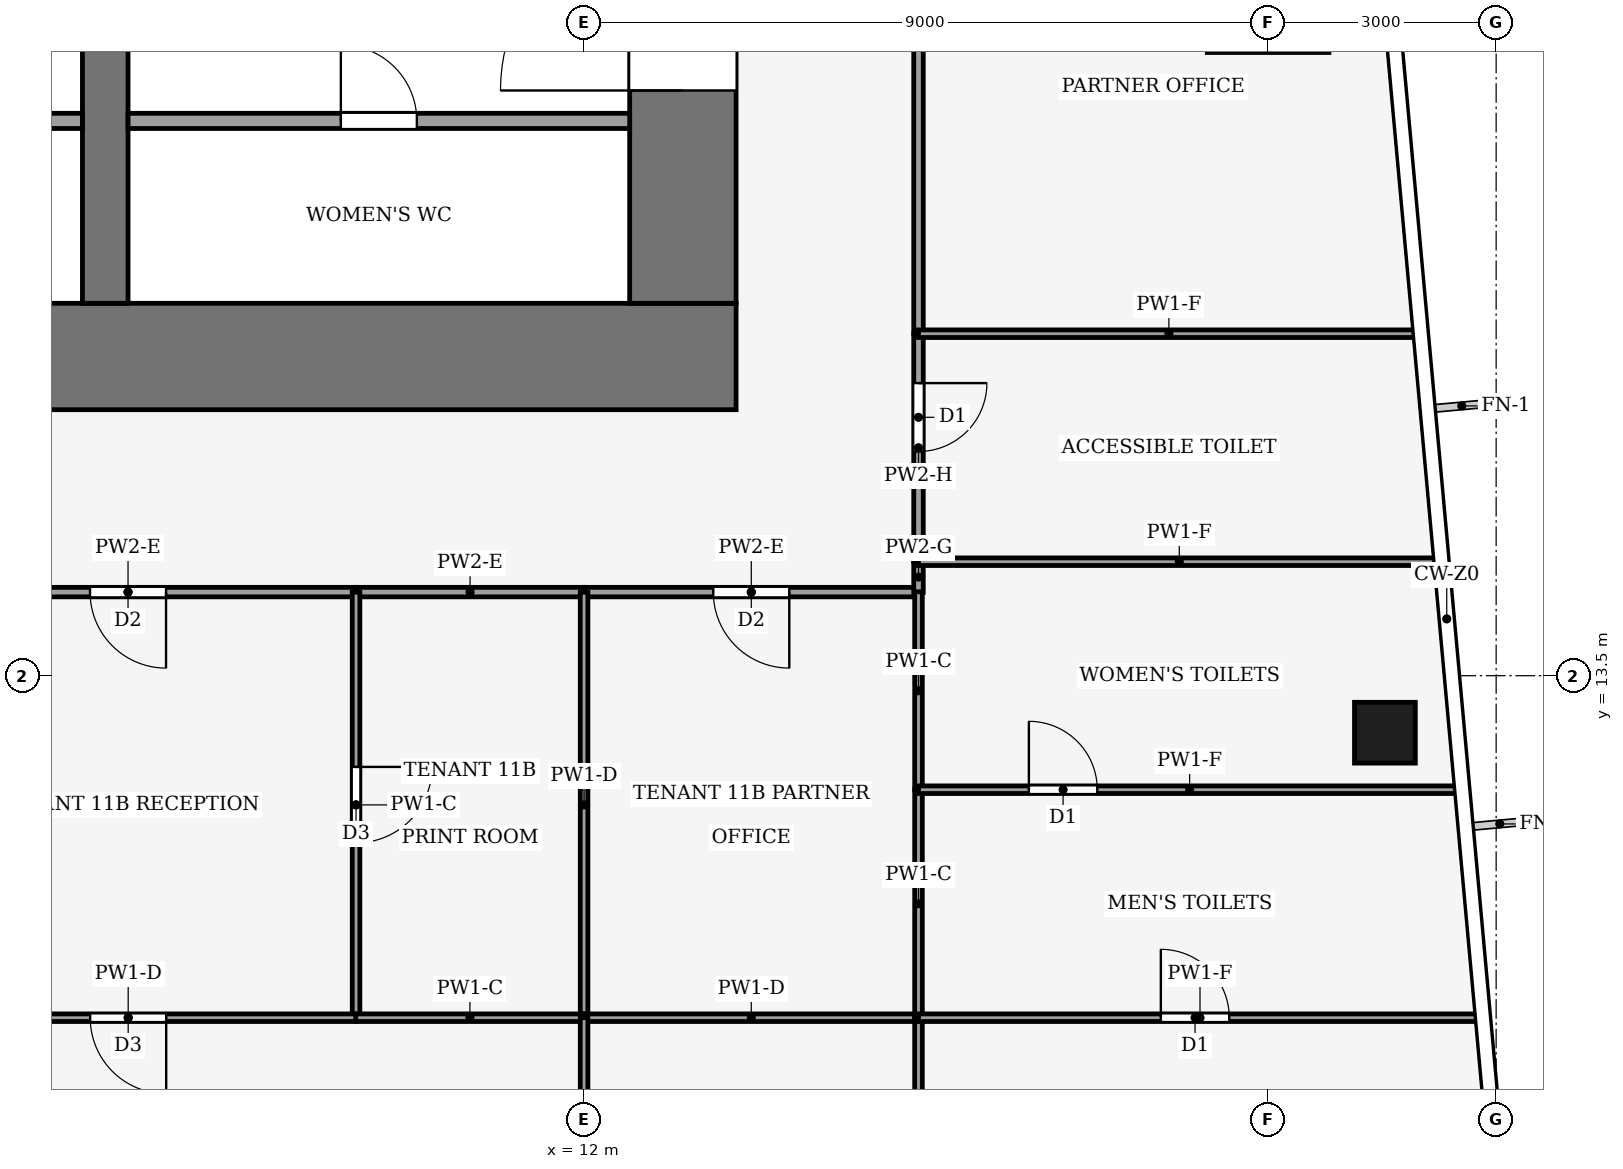
"""IFC4 building model, lengths in metres.
Left out: names, types, materials, properties, quantities, classifications, styles, units other than length and angle.
Written with IfcOpenShell. Run it as: python <this file> out.ifc"""

import sys

from ifc_helpers import new_model, si_unit, direction, frame, frame_2d, origin, origin_2d, place, context, subcontext, project, spatial, rectangle, hollow_rectangle, extrude, element, fill, save


model = new_model("IFC4")
c1 = context("Model", 3, precision=1e-05, world=origin(), true_north=direction((0.0, 1.0)))
c2 = subcontext(c1, "Body", "Model", "MODEL_VIEW")
j1 = project(units=[si_unit("LENGTHUNIT", "METRE"), si_unit("PLANEANGLEUNIT", "RADIAN")], contexts=[c1])
p1 = place(None, origin())
s1 = spatial("IfcSite", under=j1, at=p1, CompositionType="ELEMENT")
p2 = place(p1, origin())
s2 = spatial("IfcBuilding", under=s1, at=p2, CompositionType="ELEMENT")
p3 = place(p2, frame((0.0, 0.0, 50.0)))
s3 = spatial("IfcBuildingStorey", under=s2, at=p3, CompositionType="ELEMENT", Elevation=50.0)
p4 = place(p3, frame((-14.0, 17.7, -0.13), z_axis=(0.0, 0.0, 1.0), x_axis=(1.0, 0.0, 0.0)))
e1 = element("IfcWall", 1, at=p4, inside=s3, PredefinedType="SHEAR", context=c2, shape_type="SweptSolid", body=[
    extrude(rectangle(XDim=28.0, YDim=1.4, at=frame_2d((14.0, 0.0))), origin(), (0.0, 0.0, 1.0), 4.0),
])
p5 = place(p3, frame((13.3, 18.4, -0.13), z_axis=(0.0, 0.0, 1.0), x_axis=(0.0, 1.0, 0.0)))
e2 = element("IfcWall", 2, at=p5, inside=s3, PredefinedType="SHEAR", context=c2, shape_type="SweptSolid", body=[
    extrude(rectangle(XDim=19.2, YDim=1.4, at=frame_2d((9.6, 0.0))), origin(), (0.0, 0.0, 1.0), 4.0),
])
p6 = place(p5, frame((2.8, 0.0, 0.13)))
e3 = element("IfcOpeningElement", 3, at=p6, cuts=e2, PredefinedType="OPENING", context=c2, shape_type="SweptSolid", body=[
    extrude(rectangle(XDim=2.4, YDim=2.4, at=frame_2d((1.2, 1.2))), frame((0.0, 0.71, 0.0), z_axis=(0.0, -1.0, 0.0), x_axis=(1.0, 0.0, 0.0)), (0.0, 0.0, 1.0), 1.42),
])
p7 = place(p5, frame((13.3, 0.0, 0.13)))
e4 = element("IfcOpeningElement", 4, at=p7, cuts=e2, PredefinedType="OPENING", context=c2, shape_type="SweptSolid", body=[
    extrude(rectangle(XDim=2.4, YDim=2.4, at=frame_2d((1.2, 1.2))), frame((0.0, 0.71, 0.0), z_axis=(0.0, -1.0, 0.0), x_axis=(1.0, 0.0, 0.0)), (0.0, 0.0, 1.0), 1.42),
])
p8 = place(p3, frame((5.7, 18.4, -0.13), z_axis=(0.0, 0.0, 1.0), x_axis=(0.0, 1.0, 0.0)))
e5 = element("IfcWall", 5, at=p8, inside=s3, PredefinedType="SHEAR", context=c2, shape_type="SweptSolid", body=[
    extrude(rectangle(XDim=19.2, YDim=0.6, at=frame_2d((9.6, 0.0))), origin(), (0.0, 0.0, 1.0), 4.0),
])
p9 = place(p8, frame((8.35, 0.0, 0.13)))
e6 = element("IfcOpeningElement", 6, at=p9, cuts=e5, PredefinedType="OPENING", context=c2, shape_type="SweptSolid", body=[
    extrude(rectangle(XDim=0.9, YDim=2.1, at=frame_2d((0.45, 1.05))), frame((0.0, 0.31, 0.0), z_axis=(0.0, -1.0, 0.0), x_axis=(1.0, 0.0, 0.0)), (0.0, 0.0, 1.0), 0.62),
])
p10 = place(p8, frame((13.3, 0.0, 0.13)))
e7 = element("IfcOpeningElement", 7, at=p10, cuts=e5, PredefinedType="OPENING", context=c2, shape_type="SweptSolid", body=[
    extrude(rectangle(XDim=2.4, YDim=2.4, at=frame_2d((1.2, 1.2))), frame((0.0, 0.31, 0.0), z_axis=(0.0, -1.0, 0.0), x_axis=(1.0, 0.0, 0.0)), (0.0, 0.0, 1.0), 0.62),
])
p11 = place(p3, frame((22.536, 12.75, 0.0), z_axis=(0.0, 0.0, 1.0), x_axis=(1.0, 0.0, 0.0)))
e8 = element("IfcColumn", 8, at=p11, inside=s3, PredefinedType="COLUMN", context=c2, shape_type="SweptSolid", body=[
    extrude(hollow_rectangle(XDim=0.8, YDim=0.8, WallThickness=0.04, at=origin_2d()), origin(), (0.0, 0.0, 1.0), 4.0),
])
p12 = place(p3, frame((-5.4, 20.8, 0.0), z_axis=(0.0, 0.0, 1.0), x_axis=(1.0, 0.0, 0.0)))
e9 = element("IfcWall", 9, at=p12, inside=s3, PredefinedType="PARTITIONING", context=c2, shape_type="SweptSolid", body=[
    extrude(rectangle(XDim=10.8, YDim=0.2, at=frame_2d((5.4, 0.0))), origin(), (0.0, 0.0, 1.0), 3.87),
])
p13 = place(p12, frame((0.75, 0.0, 0.0)))
e10 = element("IfcOpeningElement", 10, at=p13, cuts=e9, PredefinedType="OPENING", context=c2, shape_type="SweptSolid", body=[
    extrude(rectangle(XDim=1.2, YDim=2.2, at=frame_2d((0.6, 1.1))), frame((0.0, 0.11, 0.0), z_axis=(0.0, -1.0, 0.0), x_axis=(1.0, 0.0, 0.0)), (0.0, 0.0, 1.0), 0.22),
])
p14 = place(p12, frame((3.45, 0.0, 0.0)))
e11 = element("IfcOpeningElement", 11, at=p14, cuts=e9, PredefinedType="OPENING", context=c2, shape_type="SweptSolid", body=[
    extrude(rectangle(XDim=1.2, YDim=2.2, at=frame_2d((0.6, 1.1))), frame((0.0, 0.11, 0.0), z_axis=(0.0, -1.0, 0.0), x_axis=(1.0, 0.0, 0.0)), (0.0, 0.0, 1.0), 0.22),
])
p15 = place(p12, frame((6.15, 0.0, 0.0)))
e12 = element("IfcOpeningElement", 12, at=p15, cuts=e9, PredefinedType="OPENING", context=c2, shape_type="SweptSolid", body=[
    extrude(rectangle(XDim=1.2, YDim=2.2, at=frame_2d((0.6, 1.1))), frame((0.0, 0.11, 0.0), z_axis=(0.0, -1.0, 0.0), x_axis=(1.0, 0.0, 0.0)), (0.0, 0.0, 1.0), 0.22),
])
p16 = place(p12, frame((8.85, 0.0, 0.0)))
e13 = element("IfcOpeningElement", 13, at=p16, cuts=e9, PredefinedType="OPENING", context=c2, shape_type="SweptSolid", body=[
    extrude(rectangle(XDim=1.2, YDim=2.2, at=frame_2d((0.6, 1.1))), frame((0.0, 0.11, 0.0), z_axis=(0.0, -1.0, 0.0), x_axis=(1.0, 0.0, 0.0)), (0.0, 0.0, 1.0), 0.22),
])
p17 = place(p3, frame((6.0, 20.8, 0.0), z_axis=(0.0, 0.0, 1.0), x_axis=(1.0, 0.0, 0.0)))
e14 = element("IfcWall", 14, at=p17, inside=s3, PredefinedType="PARTITIONING", context=c2, shape_type="SweptSolid", body=[
    extrude(rectangle(XDim=6.6, YDim=0.2, at=frame_2d((3.3, 0.0))), origin(), (0.0, 0.0, 1.0), 3.87),
])
p18 = place(p17, frame((2.8, 0.0, 0.0)))
e15 = element("IfcOpeningElement", 15, at=p18, cuts=e14, PredefinedType="OPENING", context=c2, shape_type="SweptSolid", body=[
    extrude(rectangle(XDim=1.0, YDim=2.1, at=frame_2d((0.5, 1.05))), frame((0.0, 0.11, 0.0), z_axis=(0.0, -1.0, 0.0), x_axis=(1.0, 0.0, 0.0)), (0.0, 0.0, 1.0), 0.22),
])
p19 = place(p3, frame((9.0, 14.6, 0.0), z_axis=(0.0, 0.0, 1.0), x_axis=(-1.0, 0.0, 0.0)))
e16 = element("IfcWall", 16, at=p19, inside=s3, PredefinedType="PARTITIONING", context=c2, shape_type="SweptSolid", body=[
    extrude(rectangle(XDim=6.0, YDim=0.125, at=frame_2d((3.0, 0.0))), origin(), (0.0, 0.0, 1.0), 3.29),
])
p20 = place(p19, frame((2.5, 0.0, 0.0)))
e17 = element("IfcOpeningElement", 17, at=p20, cuts=e16, PredefinedType="OPENING", context=c2, shape_type="SweptSolid", body=[
    extrude(rectangle(XDim=1.0, YDim=2.1, at=frame_2d((0.5, 1.05))), frame((0.0, 0.073, 0.0), z_axis=(0.0, -1.0, 0.0), x_axis=(1.0, 0.0, 0.0)), (0.0, 0.0, 1.0), 0.145),
])
p21 = place(p3, frame((9.0, 14.6, 0.0), z_axis=(0.0, 0.0, 1.0), x_axis=(1.0, 0.0, 0.0)))
e18 = element("IfcWall", 18, at=p21, inside=s3, PredefinedType="PARTITIONING", context=c2, shape_type="SweptSolid", body=[
    extrude(rectangle(XDim=3.0, YDim=0.125, at=frame_2d((1.5, 0.0))), origin(), (0.0, 0.0, 1.0), 3.29),
])
p22 = place(p3, frame((16.4, 14.6, 0.0), z_axis=(0.0, 0.0, 1.0), x_axis=(-1.0, 0.0, 0.0)))
e19 = element("IfcWall", 19, at=p22, inside=s3, PredefinedType="PARTITIONING", context=c2, shape_type="SweptSolid", body=[
    extrude(rectangle(XDim=4.4, YDim=0.125, at=frame_2d((2.2, 0.0))), origin(), (0.0, 0.0, 1.0), 3.29),
])
p23 = place(p22, frame((1.7, 0.0, 0.0)))
e20 = element("IfcOpeningElement", 20, at=p23, cuts=e19, PredefinedType="OPENING", context=c2, shape_type="SweptSolid", body=[
    extrude(rectangle(XDim=1.0, YDim=2.1, at=frame_2d((0.5, 1.05))), frame((0.0, 0.073, 0.0), z_axis=(0.0, -1.0, 0.0), x_axis=(1.0, 0.0, 0.0)), (0.0, 0.0, 1.0), 0.145),
])
p24 = place(p3, frame((16.4, 14.596, 0.0), z_axis=(0.0, 0.0, 1.0), x_axis=(0.0, 1.0, 0.0)))
e21 = element("IfcWall", 21, at=p24, inside=s3, PredefinedType="PARTITIONING", context=c2, shape_type="SweptSolid", body=[
    extrude(rectangle(XDim=0.404, YDim=0.125, at=frame_2d((0.202, 0.0))), origin(), (0.0, 0.0, 1.0), 3.87),
])
p25 = place(p3, frame((16.4, 18.0, 0.0), z_axis=(0.0, 0.0, 1.0), x_axis=(0.0, -1.0, 0.0)))
e22 = element("IfcWall", 22, at=p25, inside=s3, PredefinedType="PARTITIONING", context=c2, shape_type="SweptSolid", body=[
    extrude(rectangle(XDim=3.0, YDim=0.125, at=frame_2d((1.5, 0.0))), origin(), (0.0, 0.0, 1.0), 3.14),
])
p26 = place(p25, frame((0.65, 0.0, 0.0)))
e23 = element("IfcOpeningElement", 23, at=p26, cuts=e22, PredefinedType="OPENING", context=c2, shape_type="SweptSolid", body=[
    extrude(rectangle(XDim=0.9, YDim=2.1, at=frame_2d((0.45, 1.05))), frame((0.0, 0.073, 0.0), z_axis=(0.0, -1.0, 0.0), x_axis=(1.0, 0.0, 0.0)), (0.0, 0.0, 1.0), 0.145),
])
p27 = place(p3, frame((16.4, 27.0, 0.0), z_axis=(0.0, 0.0, 1.0), x_axis=(0.0, -1.0, 0.0)))
e24 = element("IfcWall", 24, at=p27, inside=s3, PredefinedType="PARTITIONING", context=c2, shape_type="SweptSolid", body=[
    extrude(rectangle(XDim=9.0, YDim=0.125, at=frame_2d((4.5, 0.0))), origin(), (0.0, 0.0, 1.0), 3.48),
])
p28 = place(p27, frame((4.0, 0.0, 0.0)))
e25 = element("IfcOpeningElement", 25, at=p28, cuts=e24, PredefinedType="OPENING", context=c2, shape_type="SweptSolid", body=[
    extrude(rectangle(XDim=1.0, YDim=2.1, at=frame_2d((0.5, 1.05))), frame((0.0, 0.073, 0.0), z_axis=(0.0, -1.0, 0.0), x_axis=(1.0, 0.0, 0.0)), (0.0, 0.0, 1.0), 0.145),
])
p29 = place(p3, frame((9.0, 14.6, 0.0), z_axis=(0.0, 0.0, 1.0), x_axis=(0.0, -1.0, 0.0)))
e26 = element("IfcWall", 26, at=p29, inside=s3, PredefinedType="PARTITIONING", context=c2, shape_type="SweptSolid", body=[
    extrude(rectangle(XDim=5.6, YDim=0.1, at=frame_2d((2.8, 0.0))), origin(), (0.0, 0.0, 1.0), 3.87),
])
p30 = place(p29, frame((2.3, 0.0, 0.0)))
e27 = element("IfcOpeningElement", 27, at=p30, cuts=e26, PredefinedType="OPENING", context=c2, shape_type="SweptSolid", body=[
    extrude(rectangle(XDim=1.0, YDim=2.1, at=frame_2d((0.5, 1.05))), frame((0.0, 0.06, 0.0), z_axis=(0.0, -1.0, 0.0), x_axis=(1.0, 0.0, 0.0)), (0.0, 0.0, 1.0), 0.12),
])
p31 = place(p3, frame((9.004, 9.0, 0.0), z_axis=(0.0, 0.0, 1.0), x_axis=(-1.0, 0.0, 0.0)))
e28 = element("IfcWall", 28, at=p31, inside=s3, PredefinedType="PARTITIONING", context=c2, shape_type="SweptSolid", body=[
    extrude(rectangle(XDim=6.004, YDim=0.1, at=frame_2d((3.002, 0.0))), origin(), (0.0, 0.0, 1.0), 3.29),
])
p32 = place(p31, frame((2.502, 0.0, 0.0)))
e29 = element("IfcOpeningElement", 29, at=p32, cuts=e28, PredefinedType="OPENING", context=c2, shape_type="SweptSolid", body=[
    extrude(rectangle(XDim=1.0, YDim=2.1, at=frame_2d((0.5, 1.05))), frame((0.0, 0.06, 0.0), z_axis=(0.0, -1.0, 0.0), x_axis=(1.0, 0.0, 0.0)), (0.0, 0.0, 1.0), 0.12),
])
p33 = place(p3, frame((12.0, 9.0, 0.0), z_axis=(0.0, 0.0, 1.0), x_axis=(0.0, 1.0, 0.0)))
e30 = element("IfcWall", 30, at=p33, inside=s3, PredefinedType="PARTITIONING", context=c2, shape_type="SweptSolid", body=[
    extrude(rectangle(XDim=5.6, YDim=0.1, at=frame_2d((2.8, 0.0))), origin(), (0.0, 0.0, 1.0), 3.29),
])
p34 = place(p3, frame((8.996, 9.0, 0.0), z_axis=(0.0, 0.0, 1.0), x_axis=(1.0, 0.0, 0.0)))
e31 = element("IfcWall", 31, at=p34, inside=s3, PredefinedType="PARTITIONING", context=c2, shape_type="SweptSolid", body=[
    extrude(rectangle(XDim=3.004, YDim=0.1, at=frame_2d((1.502, 0.0))), origin(), (0.0, 0.0, 1.0), 3.87),
])
p35 = place(p3, frame((12.0, 9.0, 0.0), z_axis=(0.0, 0.0, 1.0), x_axis=(1.0, 0.0, 0.0)))
e32 = element("IfcWall", 32, at=p35, inside=s3, PredefinedType="PARTITIONING", context=c2, shape_type="SweptSolid", body=[
    extrude(rectangle(XDim=4.4, YDim=0.1, at=frame_2d((2.2, 0.0))), origin(), (0.0, 0.0, 1.0), 3.29),
])
p36 = place(p3, frame((16.4, 9.0, 0.0), z_axis=(0.0, 0.0, 1.0), x_axis=(0.0, 1.0, 0.0)))
e33 = element("IfcWall", 33, at=p36, inside=s3, PredefinedType="PARTITIONING", context=c2, shape_type="SweptSolid", body=[
    extrude(rectangle(XDim=3.0, YDim=0.1, at=frame_2d((1.5, 0.0))), origin(), (0.0, 0.0, 1.0), 3.87),
])
p37 = place(p3, frame((16.4, 12.0, 0.0), z_axis=(0.0, 0.0, 1.0), x_axis=(0.0, 1.0, 0.0)))
e34 = element("IfcWall", 34, at=p37, inside=s3, PredefinedType="PARTITIONING", context=c2, shape_type="SweptSolid", body=[
    extrude(rectangle(XDim=2.604, YDim=0.1, at=frame_2d((1.302, 0.0))), origin(), (0.0, 0.0, 1.0), 3.87),
])
p38 = place(p3, frame((12.0, 9.0, 0.0), z_axis=(0.0, 0.0, 1.0), x_axis=(0.0, -1.0, 0.0)))
e35 = element("IfcWall", 35, at=p38, inside=s3, PredefinedType="PARTITIONING", context=c2, shape_type="SweptSolid", body=[
    extrude(rectangle(XDim=8.58, YDim=0.1, at=frame_2d((4.29, 0.0))), origin(), (0.0, 0.0, 1.0), 3.04),
])
p39 = place(p38, frame((2.925, 0.0, 0.0)))
e36 = element("IfcOpeningElement", 36, at=p39, cuts=e35, PredefinedType="OPENING", context=c2, shape_type="SweptSolid", body=[
    extrude(rectangle(XDim=1.0, YDim=2.1, at=frame_2d((0.5, 1.05))), frame((0.0, 0.06, 0.0), z_axis=(0.0, -1.0, 0.0), x_axis=(1.0, 0.0, 0.0)), (0.0, 0.0, 1.0), 0.12),
])
p40 = place(p3, frame((16.4, 9.0, 0.0), z_axis=(0.0, 0.0, 1.0), x_axis=(0.0, -1.0, 0.0)))
e37 = element("IfcWall", 37, at=p40, inside=s3, PredefinedType="PARTITIONING", context=c2, shape_type="SweptSolid", body=[
    extrude(rectangle(XDim=8.947, YDim=0.1, at=frame_2d((4.473, 0.0))), origin(), (0.0, 0.0, 1.0), 3.04),
])
p41 = place(p40, frame((3.908, 0.0, 0.0)))
e38 = element("IfcOpeningElement", 38, at=p41, cuts=e37, PredefinedType="OPENING", context=c2, shape_type="SweptSolid", body=[
    extrude(rectangle(XDim=1.0, YDim=2.1, at=frame_2d((0.5, 1.05))), frame((0.0, 0.06, 0.0), z_axis=(0.0, -1.0, 0.0), x_axis=(1.0, 0.0, 0.0)), (0.0, 0.0, 1.0), 0.12),
])
p42 = place(p3, frame((16.4, 9.0, 0.0), z_axis=(0.0, 0.0, 1.0), x_axis=(1.0, 0.0, 0.0)))
e39 = element("IfcWall", 39, at=p42, inside=s3, PredefinedType="PARTITIONING", context=c2, shape_type="SweptSolid", body=[
    extrude(rectangle(XDim=7.407, YDim=0.1, at=frame_2d((3.704, 0.0))), origin(), (0.0, 0.0, 1.0), 3.04),
])
p43 = place(p42, frame((3.188, 0.0, 0.0)))
e40 = element("IfcOpeningElement", 40, at=p43, cuts=e39, PredefinedType="OPENING", context=c2, shape_type="SweptSolid", body=[
    extrude(rectangle(XDim=0.9, YDim=2.1, at=frame_2d((0.45, 1.05))), frame((0.0, 0.06, 0.0), z_axis=(0.0, -1.0, 0.0), x_axis=(1.0, 0.0, 0.0)), (0.0, 0.0, 1.0), 0.12),
])
p44 = place(p3, frame((16.4, 12.0, 0.0), z_axis=(0.0, 0.0, 1.0), x_axis=(1.0, 0.0, 0.0)))
e41 = element("IfcWall", 41, at=p44, inside=s3, PredefinedType="PARTITIONING", context=c2, shape_type="SweptSolid", body=[
    extrude(rectangle(XDim=7.135, YDim=0.1, at=frame_2d((3.567, 0.0))), origin(), (0.0, 0.0, 1.0), 3.04),
])
p45 = place(p44, frame((1.452, 0.0, 0.0)))
e42 = element("IfcOpeningElement", 42, at=p45, cuts=e41, PredefinedType="OPENING", context=c2, shape_type="SweptSolid", body=[
    extrude(rectangle(XDim=0.9, YDim=2.1, at=frame_2d((0.45, 1.05))), frame((0.0, 0.06, 0.0), z_axis=(0.0, -1.0, 0.0), x_axis=(1.0, 0.0, 0.0)), (0.0, 0.0, 1.0), 0.12),
])
p46 = place(p3, frame((23.262, 15.0, 0.0), z_axis=(0.0, 0.0, 1.0), x_axis=(-1.0, 0.0, 0.0)))
e43 = element("IfcWall", 43, at=p46, inside=s3, PredefinedType="PARTITIONING", context=c2, shape_type="SweptSolid", body=[
    extrude(rectangle(XDim=6.862, YDim=0.1, at=frame_2d((3.431, 0.0))), origin(), (0.0, 0.0, 1.0), 3.04),
])
p47 = place(p3, frame((22.989, 18.0, 0.0), z_axis=(0.0, 0.0, 1.0), x_axis=(-1.0, 0.0, 0.0)))
e44 = element("IfcWall", 44, at=p47, inside=s3, PredefinedType="PARTITIONING", context=c2, shape_type="SweptSolid", body=[
    extrude(rectangle(XDim=6.589, YDim=0.1, at=frame_2d((3.294, 0.0))), origin(), (0.0, 0.0, 1.0), 3.04),
])
p48 = place(p18, origin())
e45 = element("IfcDoor", 45, at=p48, inside=s3, OperationType="SINGLE_SWING_RIGHT", PredefinedType="DOOR", context=c2, shape_type="SweptSolid", body=[
    extrude(rectangle(XDim=1.0, YDim=2.1, at=frame_2d((0.5, 1.05))), frame((0.0, 0.025, 0.0), z_axis=(0.0, -1.0, 0.0), x_axis=(1.0, 0.0, 0.0)), (0.0, 0.0, 1.0), 0.05),
])
fill(e15, e45)
p49 = place(p6, origin())
e46 = element("IfcDoor", 46, at=p49, inside=s3, OperationType="DOUBLE_DOOR_SINGLE_SWING", PredefinedType="DOOR", context=c2, shape_type="SweptSolid", body=[
    extrude(rectangle(XDim=2.4, YDim=2.4, at=frame_2d((1.2, 1.2))), frame((0.0, 0.025, 0.0), z_axis=(0.0, -1.0, 0.0), x_axis=(1.0, 0.0, 0.0)), (0.0, 0.0, 1.0), 0.05),
])
fill(e3, e46)
p50 = place(p20, origin())
e47 = element("IfcDoor", 47, at=p50, inside=s3, OperationType="SINGLE_SWING_RIGHT", PredefinedType="DOOR", context=c2, shape_type="SweptSolid", body=[
    extrude(rectangle(XDim=1.0, YDim=2.1, at=frame_2d((0.5, 1.05))), frame((0.0, 0.025, 0.0), z_axis=(0.0, -1.0, 0.0), x_axis=(1.0, 0.0, 0.0)), (0.0, 0.0, 1.0), 0.05),
])
fill(e17, e47)
p51 = place(p23, origin())
e48 = element("IfcDoor", 48, at=p51, inside=s3, OperationType="SINGLE_SWING_LEFT", PredefinedType="DOOR", context=c2, shape_type="SweptSolid", body=[
    extrude(rectangle(XDim=1.0, YDim=2.1, at=frame_2d((0.5, 1.05))), frame((0.0, 0.025, 0.0), z_axis=(0.0, -1.0, 0.0), x_axis=(1.0, 0.0, 0.0)), (0.0, 0.0, 1.0), 0.05),
])
fill(e20, e48)
p52 = place(p26, origin())
e49 = element("IfcDoor", 49, at=p52, inside=s3, OperationType="SINGLE_SWING_LEFT", PredefinedType="DOOR", context=c2, shape_type="SweptSolid", body=[
    extrude(rectangle(XDim=0.9, YDim=2.1, at=frame_2d((0.45, 1.05))), frame((0.0, 0.025, 0.0), z_axis=(0.0, -1.0, 0.0), x_axis=(1.0, 0.0, 0.0)), (0.0, 0.0, 1.0), 0.05),
])
fill(e23, e49)
p53 = place(p30, origin())
e50 = element("IfcDoor", 50, at=p53, inside=s3, OperationType="SINGLE_SWING_RIGHT", PredefinedType="DOOR", context=c2, shape_type="SweptSolid", body=[
    extrude(rectangle(XDim=1.0, YDim=2.1, at=frame_2d((0.5, 1.05))), frame((0.0, 0.025, 0.0), z_axis=(0.0, -1.0, 0.0), x_axis=(1.0, 0.0, 0.0)), (0.0, 0.0, 1.0), 0.05),
])
fill(e27, e50)
p54 = place(p32, origin())
e51 = element("IfcDoor", 51, at=p54, inside=s3, OperationType="SINGLE_SWING_LEFT", PredefinedType="DOOR", context=c2, shape_type="SweptSolid", body=[
    extrude(rectangle(XDim=1.0, YDim=2.1, at=frame_2d((0.5, 1.05))), frame((0.0, 0.025, 0.0), z_axis=(0.0, -1.0, 0.0), x_axis=(1.0, 0.0, 0.0)), (0.0, 0.0, 1.0), 0.05),
])
fill(e29, e51)
p55 = place(p43, origin())
e52 = element("IfcDoor", 52, at=p55, inside=s3, OperationType="SINGLE_SWING_LEFT", PredefinedType="DOOR", context=c2, shape_type="SweptSolid", body=[
    extrude(rectangle(XDim=0.9, YDim=2.1, at=frame_2d((0.45, 1.05))), frame((0.0, 0.025, 0.0), z_axis=(0.0, -1.0, 0.0), x_axis=(1.0, 0.0, 0.0)), (0.0, 0.0, 1.0), 0.05),
])
fill(e40, e52)
p56 = place(p45, origin())
e53 = element("IfcDoor", 53, at=p56, inside=s3, OperationType="SINGLE_SWING_LEFT", PredefinedType="DOOR", context=c2, shape_type="SweptSolid", body=[
    extrude(rectangle(XDim=0.9, YDim=2.1, at=frame_2d((0.45, 1.05))), frame((0.0, 0.025, 0.0), z_axis=(0.0, -1.0, 0.0), x_axis=(1.0, 0.0, 0.0)), (0.0, 0.0, 1.0), 0.05),
])
fill(e42, e53)
save(model, sys.argv[1])
